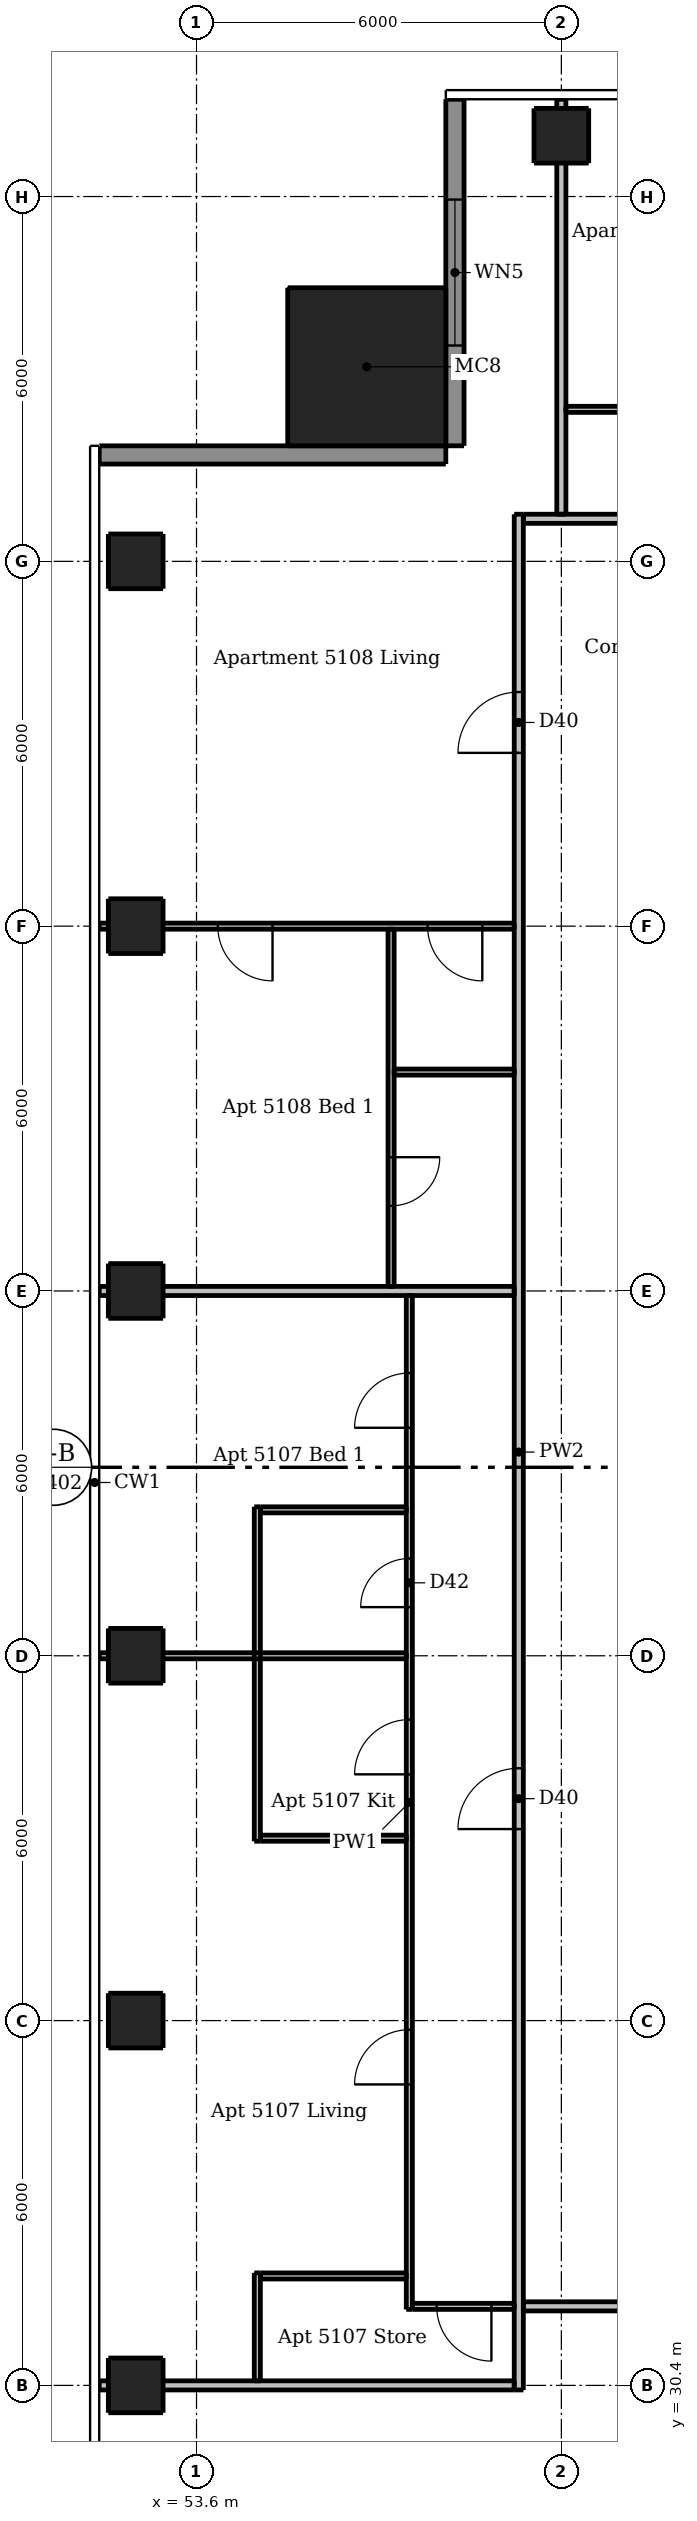
"""IFC4 building model, lengths in metres.
Left out: names, types, materials, properties, quantities, classifications, styles, units other than length and angle.
Written with IfcOpenShell. Run it as: python <this file> out.ifc"""

import sys

from ifc_helpers import new_model, si_unit, direction, frame, frame_2d, origin, origin_2d, place, context, subcontext, project, spatial, rectangle, extrude, element, fill, save


model = new_model("IFC4")
c1 = context("Model", 3, precision=1e-05, world=origin(), true_north=direction((0.0, 1.0)))
c2 = subcontext(c1, "Body", "Model", "MODEL_VIEW")
j1 = project(units=[si_unit("LENGTHUNIT", "METRE"), si_unit("PLANEANGLEUNIT", "RADIAN")], contexts=[c1])
p1 = place(None, origin())
s1 = spatial("IfcSite", under=j1, at=p1, CompositionType="ELEMENT")
p2 = place(p1, origin())
s2 = spatial("IfcBuilding", under=s1, at=p2, CompositionType="ELEMENT")
p3 = place(p2, frame((0.0, 0.0, 193.6)))
s3 = spatial("IfcBuildingStorey", under=s2, at=p3, CompositionType="ELEMENT", Elevation=193.6)
for number, where, z_axis, x_axis in (
    (1, (59.6, 67.4, 0.0), (0.0, 0.0, 1.0), (1.0, 0.0, 0.0)),
    (2, (52.6, 30.4, 0.0), (0.0, 0.0, 1.0), (1.0, 0.0, 0.0)),
    (3, (52.6, 36.4, 0.0), (0.0, 0.0, 1.0), (1.0, 0.0, 0.0)),
    (4, (52.6, 42.4, 0.0), (0.0, 0.0, 1.0), (1.0, 0.0, 0.0)),
    (5, (52.6, 48.4, 0.0), (0.0, 0.0, 1.0), (1.0, 0.0, 0.0)),
    (6, (52.6, 54.4, 0.0), (0.0, 0.0, 1.0), (1.0, 0.0, 0.0)),
    (7, (52.6, 60.4, 0.0), (0.0, 0.0, 1.0), (1.0, 0.0, 0.0)),
):
    element("IfcColumn", number, at=place(p3, frame(where, z_axis=z_axis, x_axis=x_axis)), inside=s3, PredefinedType="COLUMN", context=c2, shape_type="SweptSolid", body=[
        extrude(rectangle(XDim=0.9, YDim=0.9, at=origin_2d()), origin(), (0.0, 0.0, 1.0), 3.05),
    ])
p4 = place(p3, frame((56.4, 63.6, 0.0), z_axis=(0.0, 0.0, 1.0), x_axis=(1.0, 0.0, 0.0)))
e8 = element("IfcColumn", 8, at=p4, inside=s3, PredefinedType="COLUMN", context=c2, shape_type="SweptSolid", body=[
    extrude(rectangle(XDim=2.6, YDim=2.6, at=origin_2d()), origin(), (0.0, 0.0, 1.0), 3.3),
])
p5 = place(p3, frame((57.85, 68.0, 0.0), z_axis=(0.0, 0.0, 1.0), x_axis=(0.0, -1.0, 0.0)))
e9 = element("IfcWall", 9, at=p5, inside=s3, PredefinedType="SOLIDWALL", context=c2, shape_type="SweptSolid", body=[
    extrude(rectangle(XDim=5.7, YDim=0.3, at=frame_2d((2.85, 0.0))), origin(), (0.0, 0.0, 1.0), 3.05),
])
p6 = place(p5, frame((1.65, 0.0, 0.15)))
e10 = element("IfcOpeningElement", 10, at=p6, cuts=e9, PredefinedType="OPENING", context=c2, shape_type="SweptSolid", body=[
    extrude(rectangle(XDim=2.4, YDim=2.1, at=frame_2d((1.2, 1.05))), frame((0.0, 0.16, 0.0), z_axis=(0.0, -1.0, 0.0), x_axis=(1.0, 0.0, 0.0)), (0.0, 0.0, 1.0), 0.32),
])
p7 = place(p3, frame((57.7, 62.15, 0.0), z_axis=(0.0, 0.0, 1.0), x_axis=(-1.0, 0.0, 0.0)))
e11 = element("IfcWall", 11, at=p7, inside=s3, PredefinedType="SOLIDWALL", context=c2, shape_type="SweptSolid", body=[
    extrude(rectangle(XDim=5.7, YDim=0.3, at=frame_2d((2.85, 0.0))), origin(), (0.0, 0.0, 1.0), 3.05),
])
p8 = place(p3, frame((54.6, 30.475, 0.0), z_axis=(0.0, 0.0, 1.0), x_axis=(0.0, 1.0, 0.0)))
e12 = element("IfcWall", 12, at=p8, inside=s3, PredefinedType="PARTITIONING", context=c2, shape_type="SweptSolid", body=[
    extrude(rectangle(XDim=1.775, YDim=0.1, at=frame_2d((0.887, 0.0))), origin(), (0.0, 0.0, 1.0), 3.05),
])
p9 = place(p3, frame((54.6, 39.35, 0.0), z_axis=(0.0, 0.0, 1.0), x_axis=(0.0, 1.0, 0.0)))
e13 = element("IfcWall", 13, at=p9, inside=s3, PredefinedType="PARTITIONING", context=c2, shape_type="SweptSolid", body=[
    extrude(rectangle(XDim=5.5, YDim=0.1, at=frame_2d((2.75, 0.0))), origin(), (0.0, 0.0, 1.0), 3.05),
])
p10 = place(p3, frame((56.8, 54.35, 0.0), z_axis=(0.0, 0.0, 1.0), x_axis=(0.0, -1.0, 0.0)))
e14 = element("IfcWall", 14, at=p10, inside=s3, PredefinedType="PARTITIONING", context=c2, shape_type="SweptSolid", body=[
    extrude(rectangle(XDim=5.875, YDim=0.1, at=frame_2d((2.938, 0.0))), origin(), (0.0, 0.0, 1.0), 3.05),
])
p11 = place(p10, frame((3.75, 0.0, 0.0)))
e15 = element("IfcOpeningElement", 15, at=p11, cuts=e14, PredefinedType="OPENING", context=c2, shape_type="SweptSolid", body=[
    extrude(rectangle(XDim=0.8, YDim=2.1, at=frame_2d((0.4, 1.05))), frame((0.0, 0.06, 0.0), z_axis=(0.0, -1.0, 0.0), x_axis=(1.0, 0.0, 0.0)), (0.0, 0.0, 1.0), 0.12),
])
p12 = place(p3, frame((57.1, 31.65, 0.0), z_axis=(0.0, 0.0, 1.0), x_axis=(0.0, 1.0, 0.0)))
e16 = element("IfcWall", 16, at=p12, inside=s3, PredefinedType="PARTITIONING", context=c2, shape_type="SweptSolid", body=[
    extrude(rectangle(XDim=16.675, YDim=0.1, at=frame_2d((8.337, 0.0))), origin(), (0.0, 0.0, 1.0), 3.05),
])
p13 = place(p12, frame((3.7, 0.0, 0.0)))
e17 = element("IfcOpeningElement", 17, at=p13, cuts=e16, PredefinedType="OPENING", context=c2, shape_type="SweptSolid", body=[
    extrude(rectangle(XDim=0.9, YDim=2.1, at=frame_2d((0.45, 1.05))), frame((0.0, 0.06, 0.0), z_axis=(0.0, -1.0, 0.0), x_axis=(1.0, 0.0, 0.0)), (0.0, 0.0, 1.0), 0.12),
])
p14 = place(p12, frame((8.8, 0.0, 0.0)))
e18 = element("IfcOpeningElement", 18, at=p14, cuts=e16, PredefinedType="OPENING", context=c2, shape_type="SweptSolid", body=[
    extrude(rectangle(XDim=0.9, YDim=2.1, at=frame_2d((0.45, 1.05))), frame((0.0, 0.06, 0.0), z_axis=(0.0, -1.0, 0.0), x_axis=(1.0, 0.0, 0.0)), (0.0, 0.0, 1.0), 0.12),
])
p15 = place(p12, frame((14.5, 0.0, 0.0)))
e19 = element("IfcOpeningElement", 19, at=p15, cuts=e16, PredefinedType="OPENING", context=c2, shape_type="SweptSolid", body=[
    extrude(rectangle(XDim=0.9, YDim=2.1, at=frame_2d((0.45, 1.05))), frame((0.0, 0.06, 0.0), z_axis=(0.0, -1.0, 0.0), x_axis=(1.0, 0.0, 0.0)), (0.0, 0.0, 1.0), 0.12),
])
p16 = place(p12, frame((11.55, 0.0, 0.0)))
e20 = element("IfcOpeningElement", 20, at=p16, cuts=e16, PredefinedType="OPENING", context=c2, shape_type="SweptSolid", body=[
    extrude(rectangle(XDim=0.8, YDim=2.1, at=frame_2d((0.4, 1.05))), frame((0.0, 0.06, 0.0), z_axis=(0.0, -1.0, 0.0), x_axis=(1.0, 0.0, 0.0)), (0.0, 0.0, 1.0), 0.12),
])
p17 = place(p3, frame((59.675, 62.9, 0.0), z_axis=(0.0, 0.0, 1.0), x_axis=(1.0, 0.0, 0.0)))
e21 = element("IfcWall", 21, at=p17, inside=s3, PredefinedType="PARTITIONING", context=c2, shape_type="SweptSolid", body=[
    extrude(rectangle(XDim=17.85, YDim=0.1, at=frame_2d((8.925, 0.0))), origin(), (0.0, 0.0, 1.0), 3.05),
])
p18 = place(p17, frame((10.875, 0.0, 0.0)))
e22 = element("IfcOpeningElement", 22, at=p18, cuts=e21, PredefinedType="OPENING", context=c2, shape_type="SweptSolid", body=[
    extrude(rectangle(XDim=0.9, YDim=2.1, at=frame_2d((0.45, 1.05))), frame((0.0, 0.06, 0.0), z_axis=(0.0, -1.0, 0.0), x_axis=(1.0, 0.0, 0.0)), (0.0, 0.0, 1.0), 0.12),
])
p19 = place(p17, frame((15.975, 0.0, 0.0)))
e23 = element("IfcOpeningElement", 23, at=p19, cuts=e21, PredefinedType="OPENING", context=c2, shape_type="SweptSolid", body=[
    extrude(rectangle(XDim=0.9, YDim=2.1, at=frame_2d((0.45, 1.05))), frame((0.0, 0.06, 0.0), z_axis=(0.0, -1.0, 0.0), x_axis=(1.0, 0.0, 0.0)), (0.0, 0.0, 1.0), 0.12),
])
p20 = place(p17, frame((6.375, 0.0, 0.0)))
e24 = element("IfcOpeningElement", 24, at=p20, cuts=e21, PredefinedType="OPENING", context=c2, shape_type="SweptSolid", body=[
    extrude(rectangle(XDim=0.9, YDim=2.1, at=frame_2d((0.45, 1.05))), frame((0.0, 0.06, 0.0), z_axis=(0.0, -1.0, 0.0), x_axis=(1.0, 0.0, 0.0)), (0.0, 0.0, 1.0), 0.12),
])
p21 = place(p17, frame((1.275, 0.0, 0.0)))
e25 = element("IfcOpeningElement", 25, at=p21, cuts=e21, PredefinedType="OPENING", context=c2, shape_type="SweptSolid", body=[
    extrude(rectangle(XDim=0.9, YDim=2.1, at=frame_2d((0.45, 1.05))), frame((0.0, 0.06, 0.0), z_axis=(0.0, -1.0, 0.0), x_axis=(1.0, 0.0, 0.0)), (0.0, 0.0, 1.0), 0.12),
])
p22 = place(p17, frame((4.325, 0.0, 0.0)))
e26 = element("IfcOpeningElement", 26, at=p22, cuts=e21, PredefinedType="OPENING", context=c2, shape_type="SweptSolid", body=[
    extrude(rectangle(XDim=0.8, YDim=2.1, at=frame_2d((0.4, 1.05))), frame((0.0, 0.06, 0.0), z_axis=(0.0, -1.0, 0.0), x_axis=(1.0, 0.0, 0.0)), (0.0, 0.0, 1.0), 0.12),
])
p23 = place(p3, frame((58.825, 54.4, 0.0), z_axis=(0.0, 0.0, 1.0), x_axis=(-1.0, 0.0, 0.0)))
e27 = element("IfcWall", 27, at=p23, inside=s3, PredefinedType="PARTITIONING", context=c2, shape_type="SweptSolid", body=[
    extrude(rectangle(XDim=6.825, YDim=0.1, at=frame_2d((3.413, 0.0))), origin(), (0.0, 0.0, 1.0), 2.516),
])
p24 = place(p23, frame((0.525, 0.0, 0.0)))
e28 = element("IfcOpeningElement", 28, at=p24, cuts=e27, PredefinedType="OPENING", context=c2, shape_type="SweptSolid", body=[
    extrude(rectangle(XDim=0.9, YDim=2.1, at=frame_2d((0.45, 1.05))), frame((0.0, 0.06, 0.0), z_axis=(0.0, -1.0, 0.0), x_axis=(1.0, 0.0, 0.0)), (0.0, 0.0, 1.0), 0.12),
])
p25 = place(p23, frame((3.975, 0.0, 0.0)))
e29 = element("IfcOpeningElement", 29, at=p25, cuts=e27, PredefinedType="OPENING", context=c2, shape_type="SweptSolid", body=[
    extrude(rectangle(XDim=0.9, YDim=2.1, at=frame_2d((0.45, 1.05))), frame((0.0, 0.06, 0.0), z_axis=(0.0, -1.0, 0.0), x_axis=(1.0, 0.0, 0.0)), (0.0, 0.0, 1.0), 0.12),
])
p26 = place(p3, frame((56.85, 52.0, 0.0), z_axis=(0.0, 0.0, 1.0), x_axis=(1.0, 0.0, 0.0)))
e30 = element("IfcWall", 30, at=p26, inside=s3, PredefinedType="PARTITIONING", context=c2, shape_type="SweptSolid", body=[
    extrude(rectangle(XDim=1.975, YDim=0.1, at=frame_2d((0.987, 0.0))), origin(), (0.0, 0.0, 1.0), 3.05),
])
p27 = place(p3, frame((54.65, 44.8, 0.0), z_axis=(0.0, 0.0, 1.0), x_axis=(1.0, 0.0, 0.0)))
e31 = element("IfcWall", 31, at=p27, inside=s3, PredefinedType="PARTITIONING", context=c2, shape_type="SweptSolid", body=[
    extrude(rectangle(XDim=2.4, YDim=0.1, at=frame_2d((1.2, 0.0))), origin(), (0.0, 0.0, 1.0), 3.05),
])
p28 = place(p3, frame((52.0, 42.4, 0.0), z_axis=(0.0, 0.0, 1.0), x_axis=(1.0, 0.0, 0.0)))
e32 = element("IfcWall", 32, at=p28, inside=s3, PredefinedType="PARTITIONING", context=c2, shape_type="SweptSolid", body=[
    extrude(rectangle(XDim=5.05, YDim=0.1, at=frame_2d((2.525, 0.0))), origin(), (0.0, 0.0, 1.0), 2.516),
])
for number, where, z_axis, x_axis in (
    (33, (54.65, 39.4, 0.0), (0.0, 0.0, 1.0), (1.0, 0.0, 0.0)),
    (34, (54.65, 32.2, 0.0), (0.0, 0.0, 1.0), (1.0, 0.0, 0.0)),
):
    element("IfcWall", number, at=place(p3, frame(where, z_axis=z_axis, x_axis=x_axis)), inside=s3, PredefinedType="PARTITIONING", context=c2, shape_type="SweptSolid", body=[
        extrude(rectangle(XDim=2.4, YDim=0.1, at=frame_2d((1.2, 0.0))), origin(), (0.0, 0.0, 1.0), 3.05),
    ])
p29 = place(p3, frame((58.825, 31.7, 0.0), z_axis=(0.0, 0.0, 1.0), x_axis=(-1.0, 0.0, 0.0)))
e35 = element("IfcWall", 35, at=p29, inside=s3, PredefinedType="PARTITIONING", context=c2, shape_type="SweptSolid", body=[
    extrude(rectangle(XDim=1.675, YDim=0.1, at=frame_2d((0.837, 0.0))), origin(), (0.0, 0.0, 1.0), 3.05),
])
p30 = place(p29, frame((0.375, 0.0, 0.0)))
e36 = element("IfcOpeningElement", 36, at=p30, cuts=e35, PredefinedType="OPENING", context=c2, shape_type="SweptSolid", body=[
    extrude(rectangle(XDim=0.9, YDim=2.1, at=frame_2d((0.45, 1.05))), frame((0.0, 0.06, 0.0), z_axis=(0.0, -1.0, 0.0), x_axis=(1.0, 0.0, 0.0)), (0.0, 0.0, 1.0), 0.12),
])
p31 = place(p3, frame((58.9, 30.325, 0.0), z_axis=(0.0, 0.0, 1.0), x_axis=(0.0, 1.0, 0.0)))
e37 = element("IfcWall", 37, at=p31, inside=s3, PredefinedType="PARTITIONING", context=c2, shape_type="SweptSolid", body=[
    extrude(rectangle(XDim=30.85, YDim=0.15, at=frame_2d((15.425, 0.0))), origin(), (0.0, 0.0, 1.0), 3.05),
])
p32 = place(p31, frame((9.225, 0.0, 0.0)))
e38 = element("IfcOpeningElement", 38, at=p32, cuts=e37, PredefinedType="OPENING", context=c2, shape_type="SweptSolid", body=[
    extrude(rectangle(XDim=1.0, YDim=2.1, at=frame_2d((0.5, 1.05))), frame((0.0, 0.085, 0.0), z_axis=(0.0, -1.0, 0.0), x_axis=(1.0, 0.0, 0.0)), (0.0, 0.0, 1.0), 0.17),
])
p33 = place(p31, frame((26.925, 0.0, 0.0)))
e39 = element("IfcOpeningElement", 39, at=p33, cuts=e37, PredefinedType="OPENING", context=c2, shape_type="SweptSolid", body=[
    extrude(rectangle(XDim=1.0, YDim=2.1, at=frame_2d((0.5, 1.05))), frame((0.0, 0.085, 0.0), z_axis=(0.0, -1.0, 0.0), x_axis=(1.0, 0.0, 0.0)), (0.0, 0.0, 1.0), 0.17),
])
p34 = place(p3, frame((59.6, 61.175, 0.0), z_axis=(0.0, 0.0, 1.0), x_axis=(0.0, 1.0, 0.0)))
e40 = element("IfcWall", 40, at=p34, inside=s3, PredefinedType="PARTITIONING", context=c2, shape_type="SweptSolid", body=[
    extrude(rectangle(XDim=6.825, YDim=0.15, at=frame_2d((3.413, 0.0))), origin(), (0.0, 0.0, 1.0), 2.51),
])
p35 = place(p3, frame((58.975, 61.1, 0.0), z_axis=(0.0, 0.0, 1.0), x_axis=(1.0, 0.0, 0.0)))
e41 = element("IfcWall", 41, at=p35, inside=s3, PredefinedType="PARTITIONING", context=c2, shape_type="SweptSolid", body=[
    extrude(rectangle(XDim=29.25, YDim=0.15, at=frame_2d((14.625, 0.0))), origin(), (0.0, 0.0, 1.0), 3.05),
])
p36 = place(p35, frame((9.125, 0.0, 0.0)))
e42 = element("IfcOpeningElement", 42, at=p36, cuts=e41, PredefinedType="OPENING", context=c2, shape_type="SweptSolid", body=[
    extrude(rectangle(XDim=1.0, YDim=2.1, at=frame_2d((0.5, 1.05))), frame((0.0, 0.085, 0.0), z_axis=(0.0, -1.0, 0.0), x_axis=(1.0, 0.0, 0.0)), (0.0, 0.0, 1.0), 0.17),
])
p37 = place(p35, frame((26.475, 0.0, 0.0)))
e43 = element("IfcOpeningElement", 43, at=p37, cuts=e41, PredefinedType="OPENING", context=c2, shape_type="SweptSolid", body=[
    extrude(rectangle(XDim=1.0, YDim=2.1, at=frame_2d((0.5, 1.05))), frame((0.0, 0.085, 0.0), z_axis=(0.0, -1.0, 0.0), x_axis=(1.0, 0.0, 0.0)), (0.0, 0.0, 1.0), 0.17),
])
p38 = place(p3, frame((52.0, 48.4, 0.0), z_axis=(0.0, 0.0, 1.0), x_axis=(1.0, 0.0, 0.0)))
e44 = element("IfcWall", 44, at=p38, inside=s3, PredefinedType="PARTITIONING", context=c2, shape_type="SweptSolid", body=[
    extrude(rectangle(XDim=6.825, YDim=0.15, at=frame_2d((3.413, 0.0))), origin(), (0.0, 0.0, 1.0), 2.516),
])
p39 = place(p3, frame((89.525, 31.7, 0.0), z_axis=(0.0, 0.0, 1.0), x_axis=(-1.0, 0.0, 0.0)))
e45 = element("IfcWall", 45, at=p39, inside=s3, PredefinedType="PARTITIONING", context=c2, shape_type="SweptSolid", body=[
    extrude(rectangle(XDim=30.55, YDim=0.15, at=frame_2d((15.275, 0.0))), origin(), (0.0, 0.0, 1.0), 3.05),
])
p40 = place(p39, frame((26.775, 0.0, 0.0)))
e46 = element("IfcOpeningElement", 46, at=p40, cuts=e45, PredefinedType="OPENING", context=c2, shape_type="SweptSolid", body=[
    extrude(rectangle(XDim=1.0, YDim=2.1, at=frame_2d((0.5, 1.05))), frame((0.0, 0.085, 0.0), z_axis=(0.0, -1.0, 0.0), x_axis=(1.0, 0.0, 0.0)), (0.0, 0.0, 1.0), 0.17),
])
p41 = place(p39, frame((9.075, 0.0, 0.0)))
e47 = element("IfcOpeningElement", 47, at=p41, cuts=e45, PredefinedType="OPENING", context=c2, shape_type="SweptSolid", body=[
    extrude(rectangle(XDim=1.0, YDim=2.1, at=frame_2d((0.5, 1.05))), frame((0.0, 0.085, 0.0), z_axis=(0.0, -1.0, 0.0), x_axis=(1.0, 0.0, 0.0)), (0.0, 0.0, 1.0), 0.17),
])
p42 = place(p3, frame((52.0, 30.4, 0.0), z_axis=(0.0, 0.0, 1.0), x_axis=(1.0, 0.0, 0.0)))
e48 = element("IfcWall", 48, at=p42, inside=s3, PredefinedType="PARTITIONING", context=c2, shape_type="SweptSolid", body=[
    extrude(rectangle(XDim=6.825, YDim=0.15, at=frame_2d((3.413, 0.0))), origin(), (0.0, 0.0, 1.0), 2.647),
])
p43 = place(p6, origin())
e49 = element("IfcWindow", 49, at=p43, inside=s3, PartitioningType="DOUBLE_PANEL_VERTICAL", PredefinedType="WINDOW", context=c2, shape_type="SweptSolid", body=[
    extrude(rectangle(XDim=2.4, YDim=2.1, at=frame_2d((1.2, 1.05))), frame((0.0, 0.03, 0.0), z_axis=(0.0, -1.0, 0.0), x_axis=(1.0, 0.0, 0.0)), (0.0, 0.0, 1.0), 0.06),
])
fill(e10, e49)
p44 = place(p32, origin())
e50 = element("IfcDoor", 50, at=p44, inside=s3, OperationType="SINGLE_SWING_LEFT", PredefinedType="DOOR", context=c2, shape_type="SweptSolid", body=[
    extrude(rectangle(XDim=1.0, YDim=2.1, at=frame_2d((0.5, 1.05))), frame((0.0, 0.025, 0.0), z_axis=(0.0, -1.0, 0.0), x_axis=(1.0, 0.0, 0.0)), (0.0, 0.0, 1.0), 0.05),
])
fill(e38, e50)
p45 = place(p13, origin())
e51 = element("IfcDoor", 51, at=p45, inside=s3, OperationType="SINGLE_SWING_LEFT", PredefinedType="DOOR", context=c2, shape_type="SweptSolid", body=[
    extrude(rectangle(XDim=0.9, YDim=2.1, at=frame_2d((0.45, 1.05))), frame((0.0, 0.025, 0.0), z_axis=(0.0, -1.0, 0.0), x_axis=(1.0, 0.0, 0.0)), (0.0, 0.0, 1.0), 0.05),
])
fill(e17, e51)
p46 = place(p14, origin())
e52 = element("IfcDoor", 52, at=p46, inside=s3, OperationType="SINGLE_SWING_LEFT", PredefinedType="DOOR", context=c2, shape_type="SweptSolid", body=[
    extrude(rectangle(XDim=0.9, YDim=2.1, at=frame_2d((0.45, 1.05))), frame((0.0, 0.025, 0.0), z_axis=(0.0, -1.0, 0.0), x_axis=(1.0, 0.0, 0.0)), (0.0, 0.0, 1.0), 0.05),
])
fill(e18, e52)
p47 = place(p30, origin())
e53 = element("IfcDoor", 53, at=p47, inside=s3, OperationType="SINGLE_SWING_LEFT", PredefinedType="DOOR", context=c2, shape_type="SweptSolid", body=[
    extrude(rectangle(XDim=0.9, YDim=2.1, at=frame_2d((0.45, 1.05))), frame((0.0, 0.025, 0.0), z_axis=(0.0, -1.0, 0.0), x_axis=(1.0, 0.0, 0.0)), (0.0, 0.0, 1.0), 0.05),
])
fill(e36, e53)
p48 = place(p15, origin())
e54 = element("IfcDoor", 54, at=p48, inside=s3, OperationType="SINGLE_SWING_LEFT", PredefinedType="DOOR", context=c2, shape_type="SweptSolid", body=[
    extrude(rectangle(XDim=0.9, YDim=2.1, at=frame_2d((0.45, 1.05))), frame((0.0, 0.025, 0.0), z_axis=(0.0, -1.0, 0.0), x_axis=(1.0, 0.0, 0.0)), (0.0, 0.0, 1.0), 0.05),
])
fill(e19, e54)
p49 = place(p16, origin())
e55 = element("IfcDoor", 55, at=p49, inside=s3, OperationType="SINGLE_SWING_LEFT", PredefinedType="DOOR", context=c2, shape_type="SweptSolid", body=[
    extrude(rectangle(XDim=0.8, YDim=2.1, at=frame_2d((0.4, 1.05))), frame((0.0, 0.025, 0.0), z_axis=(0.0, -1.0, 0.0), x_axis=(1.0, 0.0, 0.0)), (0.0, 0.0, 1.0), 0.05),
])
fill(e20, e55)
p50 = place(p33, origin())
e56 = element("IfcDoor", 56, at=p50, inside=s3, OperationType="SINGLE_SWING_LEFT", PredefinedType="DOOR", context=c2, shape_type="SweptSolid", body=[
    extrude(rectangle(XDim=1.0, YDim=2.1, at=frame_2d((0.5, 1.05))), frame((0.0, 0.025, 0.0), z_axis=(0.0, -1.0, 0.0), x_axis=(1.0, 0.0, 0.0)), (0.0, 0.0, 1.0), 0.05),
])
fill(e39, e56)
p51 = place(p24, origin())
e57 = element("IfcDoor", 57, at=p51, inside=s3, OperationType="SINGLE_SWING_LEFT", PredefinedType="DOOR", context=c2, shape_type="SweptSolid", body=[
    extrude(rectangle(XDim=0.9, YDim=2.1, at=frame_2d((0.45, 1.05))), frame((0.0, 0.025, 0.0), z_axis=(0.0, -1.0, 0.0), x_axis=(1.0, 0.0, 0.0)), (0.0, 0.0, 1.0), 0.05),
])
fill(e28, e57)
p52 = place(p25, origin())
e58 = element("IfcDoor", 58, at=p52, inside=s3, OperationType="SINGLE_SWING_LEFT", PredefinedType="DOOR", context=c2, shape_type="SweptSolid", body=[
    extrude(rectangle(XDim=0.9, YDim=2.1, at=frame_2d((0.45, 1.05))), frame((0.0, 0.025, 0.0), z_axis=(0.0, -1.0, 0.0), x_axis=(1.0, 0.0, 0.0)), (0.0, 0.0, 1.0), 0.05),
])
fill(e29, e58)
p53 = place(p11, origin())
e59 = element("IfcDoor", 59, at=p53, inside=s3, OperationType="SINGLE_SWING_LEFT", PredefinedType="DOOR", context=c2, shape_type="SweptSolid", body=[
    extrude(rectangle(XDim=0.8, YDim=2.1, at=frame_2d((0.4, 1.05))), frame((0.0, 0.025, 0.0), z_axis=(0.0, -1.0, 0.0), x_axis=(1.0, 0.0, 0.0)), (0.0, 0.0, 1.0), 0.05),
])
fill(e15, e59)
save(model, sys.argv[1])
